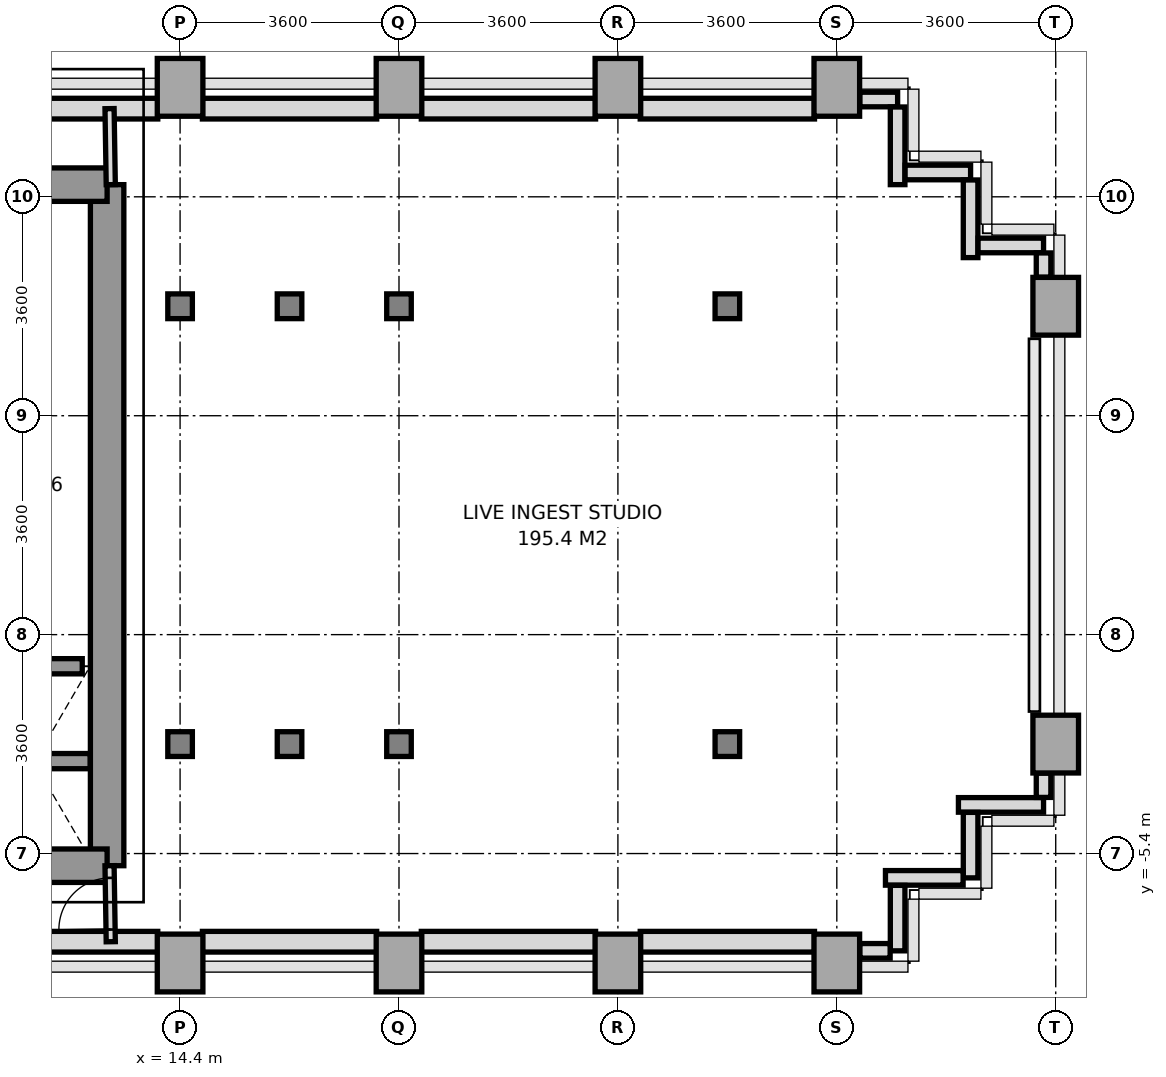
"""IFC4 building model, lengths in metres.
Left out: names, types, materials, properties, quantities, classifications, styles, units other than length and angle.
Written with IfcOpenShell. Run it as: python <this file> out.ifc"""

import sys

from ifc_helpers import new_model, si_unit, direction, frame, frame_2d, origin, origin_2d, place, context, subcontext, project, spatial, rectangle, i_section, extrude, source, transform, mapped, element, fill, save


model = new_model("IFC4")
c1 = context("Model", 3, precision=1e-05, world=origin(), true_north=direction((0.0, 1.0)))
c2 = subcontext(c1, "Body", "Model", "MODEL_VIEW")
j1 = project(units=[si_unit("LENGTHUNIT", "METRE"), si_unit("PLANEANGLEUNIT", "RADIAN")], contexts=[c1])
p1 = place(None, origin())
s1 = spatial("IfcSite", under=j1, at=p1, CompositionType="ELEMENT")
p2 = place(p1, origin())
s2 = spatial("IfcBuilding", under=s1, at=p2, CompositionType="ELEMENT")
p3 = place(p2, frame((0.0, 0.0, 34.0)))
s3 = spatial("IfcBuildingStorey", under=s2, at=p3, CompositionType="ELEMENT", Elevation=34.0)
m1 = source(origin(), c2, "Body", "SweptSolid", [
    extrude(rectangle(XDim=0.75, YDim=0.95, at=origin_2d()), origin(), (0.0, 0.0, 1.0), 3.2),
])
p4 = place(p3, frame((14.4, -7.2, 0.0), z_axis=(0.0, 0.0, 1.0), x_axis=(1.0, 0.0, 0.0)))
e1 = element("IfcColumn", 1, at=p4, inside=s3, PredefinedType="COLUMN", context=c2, shape_type="MappedRepresentation", body=[
    mapped(m1, transform((0.0, 0.0, 0.0), x_axis=(1.0, 0.0, 0.0), y_axis=(0.0, 1.0, 0.0), z_axis=(0.0, 0.0, 1.0), scale=1.0)),
])
m2 = source(origin(), c2, "Body", "SweptSolid", [
    extrude(i_section(OverallWidth=0.404, OverallDepth=0.407, WebThickness=0.022, FlangeThickness=0.035, at=origin_2d()), origin(), (0.0, 0.0, 1.0), 3.2),
])
for number, where, z_axis, x_axis in (
    (2, (14.4, -3.6, 0.0), (0.0, 0.0, 1.0), (1.0, 0.0, 0.0)),
    (3, (14.4, 3.6, 0.0), (0.0, 0.0, 1.0), (1.0, 0.0, 0.0)),
):
    element("IfcColumn", number, at=place(p3, frame(where, z_axis=z_axis, x_axis=x_axis)), inside=s3, PredefinedType="COLUMN", context=c2, shape_type="MappedRepresentation", body=[
        mapped(m2, transform((0.0, 0.0, 0.0), x_axis=(1.0, 0.0, 0.0), y_axis=(0.0, 1.0, 0.0), z_axis=(0.0, 0.0, 1.0), scale=1.0)),
    ])
p5 = place(p3, frame((14.4, 7.2, 0.0), z_axis=(0.0, 0.0, 1.0), x_axis=(1.0, 0.0, 0.0)))
e4 = element("IfcColumn", 4, at=p5, inside=s3, PredefinedType="COLUMN", context=c2, shape_type="MappedRepresentation", body=[
    mapped(m1, transform((0.0, 0.0, 0.0), x_axis=(1.0, 0.0, 0.0), y_axis=(0.0, 1.0, 0.0), z_axis=(0.0, 0.0, 1.0), scale=1.0)),
])
for number, where, z_axis, x_axis in (
    (5, (16.2, -3.6, 0.0), (0.0, 0.0, 1.0), (1.0, 0.0, 0.0)),
    (6, (16.2, 3.6, 0.0), (0.0, 0.0, 1.0), (1.0, 0.0, 0.0)),
):
    element("IfcColumn", number, at=place(p3, frame(where, z_axis=z_axis, x_axis=x_axis)), inside=s3, PredefinedType="COLUMN", context=c2, shape_type="MappedRepresentation", body=[
        mapped(m2, transform((0.0, 0.0, 0.0), x_axis=(1.0, 0.0, 0.0), y_axis=(0.0, 1.0, 0.0), z_axis=(0.0, 0.0, 1.0), scale=1.0)),
    ])
p6 = place(p3, frame((18.0, -7.2, 0.0), z_axis=(0.0, 0.0, 1.0), x_axis=(1.0, 0.0, 0.0)))
e7 = element("IfcColumn", 7, at=p6, inside=s3, PredefinedType="COLUMN", context=c2, shape_type="MappedRepresentation", body=[
    mapped(m1, transform((0.0, 0.0, 0.0), x_axis=(1.0, 0.0, 0.0), y_axis=(0.0, 1.0, 0.0), z_axis=(0.0, 0.0, 1.0), scale=1.0)),
])
for number, where, z_axis, x_axis in (
    (8, (18.0, -3.6, 0.0), (0.0, 0.0, 1.0), (1.0, 0.0, 0.0)),
    (9, (18.0, 3.6, 0.0), (0.0, 0.0, 1.0), (1.0, 0.0, 0.0)),
):
    element("IfcColumn", number, at=place(p3, frame(where, z_axis=z_axis, x_axis=x_axis)), inside=s3, PredefinedType="COLUMN", context=c2, shape_type="MappedRepresentation", body=[
        mapped(m2, transform((0.0, 0.0, 0.0), x_axis=(1.0, 0.0, 0.0), y_axis=(0.0, 1.0, 0.0), z_axis=(0.0, 0.0, 1.0), scale=1.0)),
    ])
for number, where, z_axis, x_axis in (
    (10, (18.0, 7.2, 0.0), (0.0, 0.0, 1.0), (1.0, 0.0, 0.0)),
    (11, (21.6, -7.2, 0.0), (0.0, 0.0, 1.0), (1.0, 0.0, 0.0)),
    (12, (21.6, 7.2, 0.0), (0.0, 0.0, 1.0), (1.0, 0.0, 0.0)),
):
    element("IfcColumn", number, at=place(p3, frame(where, z_axis=z_axis, x_axis=x_axis)), inside=s3, PredefinedType="COLUMN", context=c2, shape_type="MappedRepresentation", body=[
        mapped(m1, transform((0.0, 0.0, 0.0), x_axis=(1.0, 0.0, 0.0), y_axis=(0.0, 1.0, 0.0), z_axis=(0.0, 0.0, 1.0), scale=1.0)),
    ])
for number, where, z_axis, x_axis in (
    (13, (23.4, -3.6, 0.0), (0.0, 0.0, 1.0), (1.0, 0.0, 0.0)),
    (14, (23.4, 3.6, 0.0), (0.0, 0.0, 1.0), (1.0, 0.0, 0.0)),
):
    element("IfcColumn", number, at=place(p3, frame(where, z_axis=z_axis, x_axis=x_axis)), inside=s3, PredefinedType="COLUMN", context=c2, shape_type="MappedRepresentation", body=[
        mapped(m2, transform((0.0, 0.0, 0.0), x_axis=(1.0, 0.0, 0.0), y_axis=(0.0, 1.0, 0.0), z_axis=(0.0, 0.0, 1.0), scale=1.0)),
    ])
for number, where, z_axis, x_axis in (
    (15, (25.2, -7.2, 0.0), (0.0, 0.0, 1.0), (1.0, 0.0, 0.0)),
    (16, (25.2, 7.2, 0.0), (0.0, 0.0, 1.0), (1.0, 0.0, 0.0)),
    (17, (28.8, -3.6, 0.0), (0.0, 0.0, 1.0), (1.0, 0.0, 0.0)),
    (18, (28.8, 3.6, 0.0), (0.0, 0.0, 1.0), (1.0, 0.0, 0.0)),
):
    element("IfcColumn", number, at=place(p3, frame(where, z_axis=z_axis, x_axis=x_axis)), inside=s3, PredefinedType="COLUMN", context=c2, shape_type="MappedRepresentation", body=[
        mapped(m1, transform((0.0, 0.0, 0.0), x_axis=(1.0, 0.0, 0.0), y_axis=(0.0, 1.0, 0.0), z_axis=(0.0, 0.0, 1.0), scale=1.0)),
    ])
p7 = place(p3, frame((11.498, 6.85, 0.0), z_axis=(0.0, 0.0, 1.0), x_axis=(1.0, 0.0, 0.0)))
e19 = element("IfcWall", 19, at=p7, inside=s3, PredefinedType="SOLIDWALL", context=c2, shape_type="SweptSolid", body=[
    extrude(rectangle(XDim=2.535, YDim=0.34, at=frame_2d((1.268, 0.0))), origin(), (0.0, 0.0, 1.0), 3.2),
])
for number, where, z_axis, x_axis in (
    (20, (14.767, 6.85, 0.0), (0.0, 0.0, 1.0), (1.0, 0.0, 0.0)),
    (21, (18.367, 6.85, 0.0), (0.0, 0.0, 1.0), (1.0, 0.0, 0.0)),
    (22, (21.967, 6.85, 0.0), (0.0, 0.0, 1.0), (1.0, 0.0, 0.0)),
):
    element("IfcWall", number, at=place(p3, frame(where, z_axis=z_axis, x_axis=x_axis)), inside=s3, PredefinedType="SOLIDWALL", context=c2, shape_type="SweptSolid", body=[
        extrude(rectangle(XDim=2.866, YDim=0.34, at=frame_2d((1.433, 0.0))), origin(), (0.0, 0.0, 1.0), 2.45),
    ])
p8 = place(p3, frame((11.75, -6.85, 0.0), z_axis=(0.0, 0.0, 1.0), x_axis=(1.0, 0.0, 0.0)))
e23 = element("IfcWall", 23, at=p8, inside=s3, PredefinedType="SOLIDWALL", context=c2, shape_type="SweptSolid", body=[
    extrude(rectangle(XDim=2.283, YDim=0.34, at=frame_2d((1.142, 0.0))), origin(), (0.0, 0.0, 1.0), 3.2),
])
for number, where, z_axis, x_axis in (
    (24, (14.767, -6.85, 0.0), (0.0, 0.0, 1.0), (1.0, 0.0, 0.0)),
    (25, (18.367, -6.85, 0.0), (0.0, 0.0, 1.0), (1.0, 0.0, 0.0)),
    (26, (21.967, -6.85, 0.0), (0.0, 0.0, 1.0), (1.0, 0.0, 0.0)),
):
    element("IfcWall", number, at=place(p3, frame(where, z_axis=z_axis, x_axis=x_axis)), inside=s3, PredefinedType="SOLIDWALL", context=c2, shape_type="SweptSolid", body=[
        extrude(rectangle(XDim=2.866, YDim=0.34, at=frame_2d((1.433, 0.0))), origin(), (0.0, 0.0, 1.0), 2.45),
    ])
p9 = place(p3, frame((28.6, -4.6, 0.0), z_axis=(0.0, 0.0, 1.0), x_axis=(-1.0, 0.0, 0.0)))
e27 = element("IfcWall", 27, at=p9, inside=s3, PredefinedType="PARAPET", context=c2, shape_type="SweptSolid", body=[
    extrude(rectangle(XDim=1.4, YDim=0.24, at=frame_2d((0.7, 0.0))), origin(), (0.0, 0.0, 1.0), 1.15),
])
p10 = place(p3, frame((27.4, -4.723, 0.0), z_axis=(0.0, 0.0, 1.0), x_axis=(0.0, -1.0, 0.0)))
e28 = element("IfcWall", 28, at=p10, inside=s3, PredefinedType="PARAPET", context=c2, shape_type="SweptSolid", body=[
    extrude(rectangle(XDim=1.077, YDim=0.24, at=frame_2d((0.539, 0.0))), origin(), (0.0, 0.0, 1.0), 1.15),
])
p11 = place(p3, frame((27.277, -5.8, 0.0), z_axis=(0.0, 0.0, 1.0), x_axis=(-1.0, 0.0, 0.0)))
e29 = element("IfcWall", 29, at=p11, inside=s3, PredefinedType="PARAPET", context=c2, shape_type="SweptSolid", body=[
    extrude(rectangle(XDim=1.277, YDim=0.24, at=frame_2d((0.639, 0.0))), origin(), (0.0, 0.0, 1.0), 1.15),
])
p12 = place(p3, frame((26.2, -5.923, 0.0), z_axis=(0.0, 0.0, 1.0), x_axis=(0.0, -1.0, 0.0)))
e30 = element("IfcWall", 30, at=p12, inside=s3, PredefinedType="PARAPET", context=c2, shape_type="SweptSolid", body=[
    extrude(rectangle(XDim=1.077, YDim=0.24, at=frame_2d((0.539, 0.0))), origin(), (0.0, 0.0, 1.0), 1.15),
])
p13 = place(p3, frame((26.077, -7.0, 0.0), z_axis=(0.0, 0.0, 1.0), x_axis=(-1.0, 0.0, 0.0)))
e31 = element("IfcWall", 31, at=p13, inside=s3, PredefinedType="PARAPET", context=c2, shape_type="SweptSolid", body=[
    extrude(rectangle(XDim=0.499, YDim=0.24, at=frame_2d((0.25, 0.0))), origin(), (0.0, 0.0, 1.0), 1.15),
])
p14 = place(p3, frame((25.578, 7.0, 0.0), z_axis=(0.0, 0.0, 1.0), x_axis=(1.0, 0.0, 0.0)))
e32 = element("IfcWall", 32, at=p14, inside=s3, PredefinedType="PARAPET", context=c2, shape_type="SweptSolid", body=[
    extrude(rectangle(XDim=0.622, YDim=0.24, at=frame_2d((0.311, 0.0))), origin(), (0.0, 0.0, 1.0), 1.15),
])
p15 = place(p3, frame((26.2, 6.877, 0.0), z_axis=(0.0, 0.0, 1.0), x_axis=(0.0, -1.0, 0.0)))
e33 = element("IfcWall", 33, at=p15, inside=s3, PredefinedType="PARAPET", context=c2, shape_type="SweptSolid", body=[
    extrude(rectangle(XDim=1.277, YDim=0.24, at=frame_2d((0.638, 0.0))), origin(), (0.0, 0.0, 1.0), 1.15),
])
p16 = place(p3, frame((26.323, 5.8, 0.0), z_axis=(0.0, 0.0, 1.0), x_axis=(1.0, 0.0, 0.0)))
e34 = element("IfcWall", 34, at=p16, inside=s3, PredefinedType="PARAPET", context=c2, shape_type="SweptSolid", body=[
    extrude(rectangle(XDim=1.077, YDim=0.24, at=frame_2d((0.539, 0.0))), origin(), (0.0, 0.0, 1.0), 1.15),
])
p17 = place(p3, frame((27.4, 5.677, 0.0), z_axis=(0.0, 0.0, 1.0), x_axis=(0.0, -1.0, 0.0)))
e35 = element("IfcWall", 35, at=p17, inside=s3, PredefinedType="PARAPET", context=c2, shape_type="SweptSolid", body=[
    extrude(rectangle(XDim=1.277, YDim=0.24, at=frame_2d((0.639, 0.0))), origin(), (0.0, 0.0, 1.0), 1.15),
])
p18 = place(p3, frame((27.523, 4.6, 0.0), z_axis=(0.0, 0.0, 1.0), x_axis=(1.0, 0.0, 0.0)))
e36 = element("IfcWall", 36, at=p18, inside=s3, PredefinedType="PARAPET", context=c2, shape_type="SweptSolid", body=[
    extrude(rectangle(XDim=1.077, YDim=0.24, at=frame_2d((0.539, 0.0))), origin(), (0.0, 0.0, 1.0), 1.15),
])
for number, where, z_axis, x_axis in (
    (37, (28.6, 4.477, 0.0), (0.0, 0.0, 1.0), (0.0, -1.0, 0.0)),
    (38, (28.6, -4.078, 0.0), (0.0, 0.0, 1.0), (0.0, -1.0, 0.0)),
):
    element("IfcWall", number, at=place(p3, frame(where, z_axis=z_axis, x_axis=x_axis)), inside=s3, PredefinedType="PARAPET", context=c2, shape_type="SweptSolid", body=[
        extrude(rectangle(XDim=0.399, YDim=0.24, at=frame_2d((0.2, 0.0))), origin(), (0.0, 0.0, 1.0), 1.15),
    ])
p19 = place(p3, frame((13.2, -5.6, 0.0), z_axis=(0.0, 0.0, 1.0), x_axis=(0.0, 1.0, 0.0)))
e39 = element("IfcWall", 39, at=p19, inside=s3, PredefinedType="SHEAR", context=c2, shape_type="SweptSolid", body=[
    extrude(rectangle(XDim=11.2, YDim=0.55, at=frame_2d((5.6, 0.0))), origin(), (0.0, 0.0, 1.0), 3.2),
])
p20 = place(p3, frame((11.381, 5.6, 0.0), z_axis=(0.0, 0.0, 1.0), x_axis=(1.0, 0.0, 0.0)))
e40 = element("IfcWall", 40, at=p20, inside=s3, PredefinedType="SHEAR", context=c2, shape_type="SweptSolid", body=[
    extrude(rectangle(XDim=1.819, YDim=0.55, at=frame_2d((0.909, 0.0))), origin(), (0.0, 0.0, 1.0), 3.2),
])
p21 = place(p3, frame((5.4, -5.6, 0.0), z_axis=(0.0, 0.0, 1.0), x_axis=(1.0, 0.0, 0.0)))
e41 = element("IfcWall", 41, at=p21, inside=s3, PredefinedType="SHEAR", context=c2, shape_type="SweptSolid", body=[
    extrude(rectangle(XDim=7.8, YDim=0.55, at=frame_2d((3.9, 0.0))), origin(), (0.0, 0.0, 1.0), 3.2),
])
p22 = place(p21, frame((3.0, 0.0, 0.0)))
e42 = element("IfcOpeningElement", 42, at=p22, cuts=e41, PredefinedType="OPENING", context=c2, shape_type="SweptSolid", body=[
    extrude(rectangle(XDim=1.2, YDim=2.2, at=frame_2d((0.6, 1.1))), frame((0.0, 0.285, 0.0), z_axis=(0.0, -1.0, 0.0), x_axis=(1.0, 0.0, 0.0)), (0.0, 0.0, 1.0), 0.57),
])
p23 = place(p3, frame((11.08, -3.88, 0.0), z_axis=(0.0, 0.0, 1.0), x_axis=(1.0, 0.0, 0.0)))
e43 = element("IfcWall", 43, at=p23, inside=s3, PredefinedType="SOLIDWALL", context=c2, shape_type="SweptSolid", body=[
    extrude(rectangle(XDim=1.84, YDim=0.25, at=frame_2d((0.92, 0.0))), origin(), (0.0, 0.0, 1.0), 3.2),
])
p24 = place(p3, frame((11.209, -2.32, 0.0), z_axis=(0.0, 0.0, 1.0), x_axis=(1.0, 0.0, 0.0)))
e44 = element("IfcWall", 44, at=p24, inside=s3, PredefinedType="SOLIDWALL", context=c2, shape_type="SweptSolid", body=[
    extrude(rectangle(XDim=1.582, YDim=0.25, at=frame_2d((0.791, 0.0))), origin(), (0.0, 0.0, 1.0), 3.2),
])
p25 = place(p3, frame((13.26, 5.6, 0.0), z_axis=(0.0, 0.0, 1.0), x_axis=(-0.016013571389, 0.999871774545, 0.0)))
e45 = element("IfcWall", 45, at=p25, inside=s3, PredefinedType="PARTITIONING", context=c2, shape_type="SweptSolid", body=[
    extrude(rectangle(XDim=1.25, YDim=0.15, at=frame_2d((0.625, 0.0))), origin(), (0.0, 0.0, 1.0), 3.2),
])
p26 = place(p3, frame((13.26, -6.85, 0.0), z_axis=(0.0, 0.0, 1.0), x_axis=(-0.016013571389, 0.999871774545, 0.0)))
e46 = element("IfcWall", 46, at=p26, inside=s3, PredefinedType="PARTITIONING", context=c2, shape_type="SweptSolid", body=[
    extrude(rectangle(XDim=1.25, YDim=0.15, at=frame_2d((0.625, 0.0))), origin(), (0.0, 0.0, 1.0), 3.2),
])
p27 = place(p26, frame((0.2, 0.0, 0.0)))
e47 = element("IfcOpeningElement", 47, at=p27, cuts=e46, PredefinedType="OPENING", context=c2, shape_type="SweptSolid", body=[
    extrude(rectangle(XDim=0.85, YDim=2.1, at=frame_2d((0.425, 1.05))), frame((0.0, 0.085, 0.0), z_axis=(0.0, -1.0, 0.0), x_axis=(1.0, 0.0, 0.0)), (0.0, 0.0, 1.0), 0.17),
])
m3 = source(origin(), c2, "Body", "SweptSolid", [
    extrude(rectangle(XDim=0.85, YDim=2.1, at=frame_2d((0.425, 1.05))), frame((0.0, 0.025, 0.0), z_axis=(0.0, -1.0, 0.0), x_axis=(1.0, 0.0, 0.0)), (0.0, 0.0, 1.0), 0.05),
])
p28 = place(p27, origin())
e48 = element("IfcDoor", 48, at=p28, inside=s3, OperationType="SINGLE_SWING_LEFT", PredefinedType="DOOR", context=c2, shape_type="MappedRepresentation", body=[
    mapped(m3, transform((0.0, 0.0, 0.0), x_axis=(1.0, 0.0, 0.0), y_axis=(0.0, 1.0, 0.0), z_axis=(0.0, 0.0, 1.0), scale=1.0)),
])
fill(e47, e48)
save(model, sys.argv[1])
